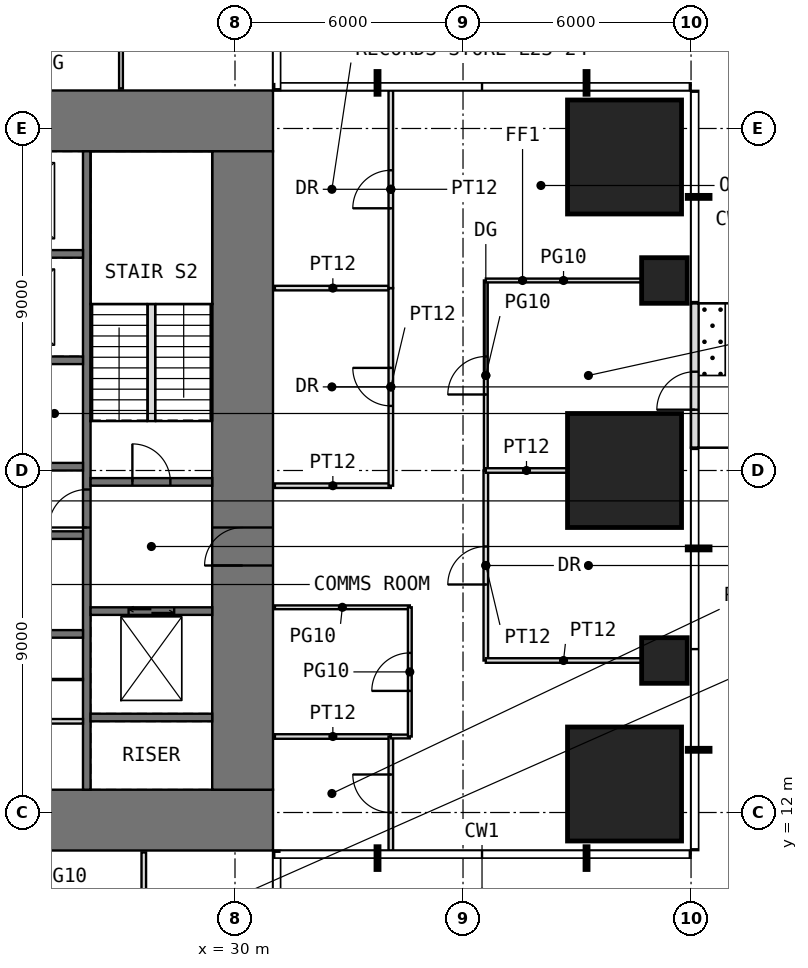
"""IFC4 building model, lengths in metres.
Left out: names, types, materials, properties, quantities, classifications, styles, units other than length and angle.
Written with IfcOpenShell. Run it as: python <this file> out.ifc"""

import sys

from ifc_helpers import new_model, si_unit, direction, frame, frame_2d, origin, origin_2d, place, context, subcontext, project, spatial, rectangle, extrude, element, fill, save


model = new_model("IFC4")
c1 = context("Model", 3, precision=1e-05, world=origin(), true_north=direction((0.0, 1.0)))
c2 = subcontext(c1, "Body", "Model", "MODEL_VIEW")
j1 = project(units=[si_unit("LENGTHUNIT", "METRE"), si_unit("PLANEANGLEUNIT", "RADIAN")], contexts=[c1])
p1 = place(None, origin())
s1 = spatial("IfcSite", under=j1, at=p1, CompositionType="ELEMENT")
p2 = place(p1, origin())
s2 = spatial("IfcBuilding", under=s1, at=p2, CompositionType="ELEMENT")
p3 = place(p2, frame((0.0, 0.0, 100.5)))
s3 = spatial("IfcBuildingStorey", under=s2, at=p3, CompositionType="ELEMENT", Elevation=100.5)
p4 = place(p3, frame((40.25, 12.75, 0.0), z_axis=(0.0, 0.0, 1.0), x_axis=(1.0, 0.0, 0.0)))
e1 = element("IfcColumn", 1, at=p4, inside=s3, PredefinedType="COLUMN", context=c2, shape_type="SweptSolid", body=[
    extrude(rectangle(XDim=3.0, YDim=3.0, at=origin_2d()), origin(), (0.0, 0.0, 1.0), 4.0),
])
p5 = place(p3, frame((41.3, 16.0, 0.0), z_axis=(0.0, 0.0, 1.0), x_axis=(1.0, 0.0, 0.0)))
e2 = element("IfcColumn", 2, at=p5, inside=s3, PredefinedType="COLUMN", context=c2, shape_type="SweptSolid", body=[
    extrude(rectangle(XDim=1.2, YDim=1.2, at=origin_2d()), origin(), (0.0, 0.0, 1.0), 4.0),
])
p6 = place(p3, frame((40.25, 21.0, 0.0), z_axis=(0.0, 0.0, 1.0), x_axis=(1.0, 0.0, 0.0)))
e3 = element("IfcColumn", 3, at=p6, inside=s3, PredefinedType="COLUMN", context=c2, shape_type="SweptSolid", body=[
    extrude(rectangle(XDim=3.0, YDim=3.0, at=origin_2d()), origin(), (0.0, 0.0, 1.0), 4.0),
])
p7 = place(p3, frame((41.3, 26.0, 0.0), z_axis=(0.0, 0.0, 1.0), x_axis=(1.0, 0.0, 0.0)))
e4 = element("IfcColumn", 4, at=p7, inside=s3, PredefinedType="COLUMN", context=c2, shape_type="SweptSolid", body=[
    extrude(rectangle(XDim=1.2, YDim=1.2, at=origin_2d()), origin(), (0.0, 0.0, 1.0), 4.0),
])
p8 = place(p3, frame((40.25, 29.25, 0.0), z_axis=(0.0, 0.0, 1.0), x_axis=(1.0, 0.0, 0.0)))
e5 = element("IfcColumn", 5, at=p8, inside=s3, PredefinedType="COLUMN", context=c2, shape_type="SweptSolid", body=[
    extrude(rectangle(XDim=3.0, YDim=3.0, at=origin_2d()), origin(), (0.0, 0.0, 1.0), 4.0),
])
p9 = place(p3, frame((42.1, 21.6, 0.0), z_axis=(0.0, 0.0, 1.0), x_axis=(0.0, 1.0, 0.0)))
e6 = element("IfcWall", 6, at=p9, inside=s3, PredefinedType="USERDEFINED", context=c2, shape_type="SweptSolid", body=[
    extrude(rectangle(XDim=3.8, YDim=0.2, at=frame_2d((1.9, 0.0))), origin(), (0.0, 0.0, 1.0), 3.75),
])
p10 = place(p9, frame((1.0, 0.0, 0.0)))
e7 = element("IfcOpeningElement", 7, at=p10, cuts=e6, PredefinedType="OPENING", context=c2, shape_type="SweptSolid", body=[
    extrude(rectangle(XDim=1.0, YDim=2.4, at=frame_2d((0.5, 1.2))), frame((0.0, 0.11, 0.0), z_axis=(0.0, -1.0, 0.0), x_axis=(1.0, 0.0, 0.0)), (0.0, 0.0, 1.0), 0.22),
])
p11 = place(p3, frame((11.0, 11.8, -0.05), z_axis=(0.0, 0.0, 1.0), x_axis=(1.0, 0.0, 0.0)))
e8 = element("IfcWall", 8, at=p11, inside=s3, PredefinedType="SHEAR", context=c2, shape_type="SweptSolid", body=[
    extrude(rectangle(XDim=20.0, YDim=1.6, at=frame_2d((10.0, 0.0))), origin(), (0.0, 0.0, 1.0), 4.0),
])
p12 = place(p11, frame((9.0, 0.0, 0.05)))
e9 = element("IfcOpeningElement", 9, at=p12, cuts=e8, PredefinedType="OPENING", context=c2, shape_type="SweptSolid", body=[
    extrude(rectangle(XDim=2.0, YDim=2.2, at=frame_2d((1.0, 1.1))), frame((0.0, 0.81, 0.0), z_axis=(0.0, -1.0, 0.0), x_axis=(1.0, 0.0, 0.0)), (0.0, 0.0, 1.0), 1.62),
])
p13 = place(p3, frame((11.0, 30.2, -0.05), z_axis=(0.0, 0.0, 1.0), x_axis=(1.0, 0.0, 0.0)))
e10 = element("IfcWall", 10, at=p13, inside=s3, PredefinedType="SHEAR", context=c2, shape_type="SweptSolid", body=[
    extrude(rectangle(XDim=20.0, YDim=1.6, at=frame_2d((10.0, 0.0))), origin(), (0.0, 0.0, 1.0), 4.0),
])
p14 = place(p13, frame((9.0, 0.0, 0.05)))
e11 = element("IfcOpeningElement", 11, at=p14, cuts=e10, PredefinedType="OPENING", context=c2, shape_type="SweptSolid", body=[
    extrude(rectangle(XDim=2.0, YDim=2.2, at=frame_2d((1.0, 1.1))), frame((0.0, 0.81, 0.0), z_axis=(0.0, -1.0, 0.0), x_axis=(1.0, 0.0, 0.0)), (0.0, 0.0, 1.0), 1.62),
])
p15 = place(p3, frame((30.2, 12.6, -0.05), z_axis=(0.0, 0.0, 1.0), x_axis=(0.0, 1.0, 0.0)))
e12 = element("IfcWall", 12, at=p15, inside=s3, PredefinedType="SHEAR", context=c2, shape_type="SweptSolid", body=[
    extrude(rectangle(XDim=16.8, YDim=1.6, at=frame_2d((8.4, 0.0))), origin(), (0.0, 0.0, 1.0), 4.0),
])
p16 = place(p15, frame((5.9, 0.0, 0.05)))
e13 = element("IfcOpeningElement", 13, at=p16, cuts=e12, PredefinedType="OPENING", context=c2, shape_type="SweptSolid", body=[
    extrude(rectangle(XDim=1.0, YDim=2.2, at=frame_2d((0.5, 1.1))), frame((0.0, 0.81, 0.0), z_axis=(0.0, -1.0, 0.0), x_axis=(1.0, 0.0, 0.0)), (0.0, 0.0, 1.0), 1.62),
])
p17 = place(p3, frame((26.1, 12.6, -0.05), z_axis=(0.0, 0.0, 1.0), x_axis=(0.0, 1.0, 0.0)))
e14 = element("IfcWall", 14, at=p17, inside=s3, PredefinedType="SHEAR", context=c2, shape_type="SweptSolid", body=[
    extrude(rectangle(XDim=16.8, YDim=0.2, at=frame_2d((8.4, 0.0))), origin(), (0.0, 0.0, 1.0), 4.0),
])
p18 = place(p17, frame((6.9, 0.0, 0.05)))
e15 = element("IfcOpeningElement", 15, at=p18, cuts=e14, PredefinedType="OPENING", context=c2, shape_type="SweptSolid", body=[
    extrude(rectangle(XDim=1.0, YDim=2.2, at=frame_2d((0.5, 1.1))), frame((0.0, 0.11, 0.0), z_axis=(0.0, -1.0, 0.0), x_axis=(1.0, 0.0, 0.0)), (0.0, 0.0, 1.0), 0.22),
])
for number, where, z_axis, x_axis in (
    (16, (22.8, 16.7, -0.05), (0.0, 0.0, 1.0), (1.0, 0.0, 0.0)),
    (17, (22.8, 19.3, -0.05), (0.0, 0.0, 1.0), (1.0, 0.0, 0.0)),
    (18, (22.8, 21.1, -0.05), (0.0, 0.0, 1.0), (1.0, 0.0, 0.0)),
    (19, (22.8, 23.9, -0.05), (0.0, 0.0, 1.0), (1.0, 0.0, 0.0)),
    (20, (22.8, 26.7, -0.05), (0.0, 0.0, 1.0), (1.0, 0.0, 0.0)),
    (21, (26.2, 14.5, -0.05), (0.0, 0.0, 1.0), (1.0, 0.0, 0.0)),
):
    element("IfcWall", number, at=place(p3, frame(where, z_axis=z_axis, x_axis=x_axis)), inside=s3, PredefinedType="SHEAR", context=c2, shape_type="SweptSolid", body=[
        extrude(rectangle(XDim=3.2, YDim=0.2, at=frame_2d((1.6, 0.0))), origin(), (0.0, 0.0, 1.0), 4.0),
    ])
p19 = place(p3, frame((26.2, 17.3, -0.05), z_axis=(0.0, 0.0, 1.0), x_axis=(1.0, 0.0, 0.0)))
e22 = element("IfcWall", 22, at=p19, inside=s3, PredefinedType="SHEAR", context=c2, shape_type="SweptSolid", body=[
    extrude(rectangle(XDim=3.2, YDim=0.2, at=frame_2d((1.6, 0.0))), origin(), (0.0, 0.0, 1.0), 4.0),
])
p20 = place(p19, frame((1.0, 0.0, 0.05)))
e23 = element("IfcOpeningElement", 23, at=p20, cuts=e22, PredefinedType="OPENING", context=c2, shape_type="SweptSolid", body=[
    extrude(rectangle(XDim=1.2, YDim=2.2, at=frame_2d((0.6, 1.1))), frame((0.0, 0.11, 0.0), z_axis=(0.0, -1.0, 0.0), x_axis=(1.0, 0.0, 0.0)), (0.0, 0.0, 1.0), 0.22),
])
p21 = place(p3, frame((26.2, 20.7, -0.05), z_axis=(0.0, 0.0, 1.0), x_axis=(1.0, 0.0, 0.0)))
e24 = element("IfcWall", 24, at=p21, inside=s3, PredefinedType="SHEAR", context=c2, shape_type="SweptSolid", body=[
    extrude(rectangle(XDim=3.2, YDim=0.2, at=frame_2d((1.6, 0.0))), origin(), (0.0, 0.0, 1.0), 4.0),
])
p22 = place(p21, frame((1.1, 0.0, 0.05)))
e25 = element("IfcOpeningElement", 25, at=p22, cuts=e24, PredefinedType="OPENING", context=c2, shape_type="SweptSolid", body=[
    extrude(rectangle(XDim=1.0, YDim=2.2, at=frame_2d((0.5, 1.1))), frame((0.0, 0.11, 0.0), z_axis=(0.0, -1.0, 0.0), x_axis=(1.0, 0.0, 0.0)), (0.0, 0.0, 1.0), 0.22),
])
p23 = place(p3, frame((22.8, 14.4, 0.0), z_axis=(0.0, 0.0, 1.0), x_axis=(1.0, 0.0, 0.0)))
e26 = element("IfcWall", 26, at=p23, inside=s3, PredefinedType="PARTITIONING", context=c2, shape_type="SweptSolid", body=[
    extrude(rectangle(XDim=3.2, YDim=0.12, at=frame_2d((1.6, 0.0))), origin(), (0.0, 0.0, 1.0), 3.75),
])
p24 = place(p3, frame((24.6, 15.5, 0.0), z_axis=(0.0, 0.0, 1.0), x_axis=(1.0, 0.0, 0.0)))
e27 = element("IfcWall", 27, at=p24, inside=s3, PredefinedType="PARTITIONING", context=c2, shape_type="SweptSolid", body=[
    extrude(rectangle(XDim=1.4, YDim=0.03, at=frame_2d((0.7, 0.0))), origin(), (0.0, 0.0, 1.0), 3.75),
])
p25 = place(p3, frame((27.0, 31.05, 0.0), z_axis=(0.0, 0.0, 1.0), x_axis=(0.0, 1.0, 0.0)))
e28 = element("IfcWall", 28, at=p25, inside=s3, PredefinedType="PARTITIONING", context=c2, shape_type="SweptSolid", body=[
    extrude(rectangle(XDim=3.55, YDim=0.1, at=frame_2d((1.775, 0.0))), origin(), (0.0, 0.0, 1.0), 3.75),
])
for number, where, z_axis, x_axis in (
    (29, (27.6, 7.9, 0.0), (0.0, 0.0, 1.0), (0.0, 1.0, 0.0)),
    (30, (31.05, 14.0, 0.0), (0.0, 0.0, 1.0), (1.0, 0.0, 0.0)),
):
    element("IfcWall", number, at=place(p3, frame(where, z_axis=z_axis, x_axis=x_axis)), inside=s3, PredefinedType="PARTITIONING", context=c2, shape_type="SweptSolid", body=[
        extrude(rectangle(XDim=3.05, YDim=0.12, at=frame_2d((1.525, 0.0))), origin(), (0.0, 0.0, 1.0), 3.75),
    ])
p26 = place(p3, frame((31.05, 17.4, 0.0), z_axis=(0.0, 0.0, 1.0), x_axis=(1.0, 0.0, 0.0)))
e31 = element("IfcWall", 31, at=p26, inside=s3, PredefinedType="PARTITIONING", context=c2, shape_type="SweptSolid", body=[
    extrude(rectangle(XDim=3.55, YDim=0.1, at=frame_2d((1.775, 0.0))), origin(), (0.0, 0.0, 1.0), 3.75),
])
for number, where, z_axis, x_axis in (
    (32, (31.05, 20.6, 0.0), (0.0, 0.0, 1.0), (1.0, 0.0, 0.0)),
    (33, (31.05, 25.8, 0.0), (0.0, 0.0, 1.0), (1.0, 0.0, 0.0)),
):
    element("IfcWall", number, at=place(p3, frame(where, z_axis=z_axis, x_axis=x_axis)), inside=s3, PredefinedType="PARTITIONING", context=c2, shape_type="SweptSolid", body=[
        extrude(rectangle(XDim=3.05, YDim=0.12, at=frame_2d((1.525, 0.0))), origin(), (0.0, 0.0, 1.0), 3.75),
    ])
p27 = place(p3, frame((34.1, 11.0, 0.0), z_axis=(0.0, 0.0, 1.0), x_axis=(0.0, 1.0, 0.0)))
e34 = element("IfcWall", 34, at=p27, inside=s3, PredefinedType="PARTITIONING", context=c2, shape_type="SweptSolid", body=[
    extrude(rectangle(XDim=3.0, YDim=0.12, at=frame_2d((1.5, 0.0))), origin(), (0.0, 0.0, 1.0), 3.75),
])
p28 = place(p27, frame((1.0, 0.0, 0.0)))
e35 = element("IfcOpeningElement", 35, at=p28, cuts=e34, PredefinedType="OPENING", context=c2, shape_type="SweptSolid", body=[
    extrude(rectangle(XDim=1.0, YDim=2.2, at=frame_2d((0.5, 1.1))), frame((0.0, 0.07, 0.0), z_axis=(0.0, -1.0, 0.0), x_axis=(1.0, 0.0, 0.0)), (0.0, 0.0, 1.0), 0.14),
])
p29 = place(p3, frame((34.1, 14.0, 0.0), z_axis=(0.0, 0.0, 1.0), x_axis=(1.0, 0.0, 0.0)))
e36 = element("IfcWall", 36, at=p29, inside=s3, PredefinedType="PARTITIONING", context=c2, shape_type="SweptSolid", body=[
    extrude(rectangle(XDim=0.5, YDim=0.1, at=frame_2d((0.25, 0.0))), origin(), (0.0, 0.0, 1.0), 3.75),
])
p30 = place(p3, frame((34.1, 20.6, 0.0), z_axis=(0.0, 0.0, 1.0), x_axis=(0.0, 1.0, 0.0)))
e37 = element("IfcWall", 37, at=p30, inside=s3, PredefinedType="PARTITIONING", context=c2, shape_type="SweptSolid", body=[
    extrude(rectangle(XDim=5.2, YDim=0.12, at=frame_2d((2.6, 0.0))), origin(), (0.0, 0.0, 1.0), 3.75),
])
p31 = place(p30, frame((2.1, 0.0, 0.0)))
e38 = element("IfcOpeningElement", 38, at=p31, cuts=e37, PredefinedType="OPENING", context=c2, shape_type="SweptSolid", body=[
    extrude(rectangle(XDim=1.0, YDim=2.2, at=frame_2d((0.5, 1.1))), frame((0.0, 0.07, 0.0), z_axis=(0.0, -1.0, 0.0), x_axis=(1.0, 0.0, 0.0)), (0.0, 0.0, 1.0), 0.14),
])
p32 = place(p3, frame((34.1, 25.8, 0.0), z_axis=(0.0, 0.0, 1.0), x_axis=(0.0, 1.0, 0.0)))
e39 = element("IfcWall", 39, at=p32, inside=s3, PredefinedType="PARTITIONING", context=c2, shape_type="SweptSolid", body=[
    extrude(rectangle(XDim=5.2, YDim=0.12, at=frame_2d((2.6, 0.0))), origin(), (0.0, 0.0, 1.0), 3.75),
])
p33 = place(p32, frame((2.1, 0.0, 0.0)))
e40 = element("IfcOpeningElement", 40, at=p33, cuts=e39, PredefinedType="OPENING", context=c2, shape_type="SweptSolid", body=[
    extrude(rectangle(XDim=1.0, YDim=2.2, at=frame_2d((0.5, 1.1))), frame((0.0, 0.07, 0.0), z_axis=(0.0, -1.0, 0.0), x_axis=(1.0, 0.0, 0.0)), (0.0, 0.0, 1.0), 0.14),
])
p34 = place(p3, frame((34.6, 14.0, 0.0), z_axis=(0.0, 0.0, 1.0), x_axis=(0.0, 1.0, 0.0)))
e41 = element("IfcWall", 41, at=p34, inside=s3, PredefinedType="PARTITIONING", context=c2, shape_type="SweptSolid", body=[
    extrude(rectangle(XDim=3.4, YDim=0.1, at=frame_2d((1.7, 0.0))), origin(), (0.0, 0.0, 1.0), 3.75),
])
p35 = place(p34, frame((1.2, 0.0, 0.0)))
e42 = element("IfcOpeningElement", 42, at=p35, cuts=e41, PredefinedType="OPENING", context=c2, shape_type="SweptSolid", body=[
    extrude(rectangle(XDim=1.0, YDim=2.4, at=frame_2d((0.5, 1.2))), frame((0.0, 0.06, 0.0), z_axis=(0.0, -1.0, 0.0), x_axis=(1.0, 0.0, 0.0)), (0.0, 0.0, 1.0), 0.12),
])
p36 = place(p3, frame((36.6, 16.0, 0.0), z_axis=(0.0, 0.0, 1.0), x_axis=(0.0, 1.0, 0.0)))
e43 = element("IfcWall", 43, at=p36, inside=s3, PredefinedType="PARTITIONING", context=c2, shape_type="SweptSolid", body=[
    extrude(rectangle(XDim=5.0, YDim=0.12, at=frame_2d((2.5, 0.0))), origin(), (0.0, 0.0, 1.0), 3.75),
])
p37 = place(p36, frame((2.0, 0.0, 0.0)))
e44 = element("IfcOpeningElement", 44, at=p37, cuts=e43, PredefinedType="OPENING", context=c2, shape_type="SweptSolid", body=[
    extrude(rectangle(XDim=1.0, YDim=2.2, at=frame_2d((0.5, 1.1))), frame((0.0, 0.07, 0.0), z_axis=(0.0, -1.0, 0.0), x_axis=(1.0, 0.0, 0.0)), (0.0, 0.0, 1.0), 0.14),
])
p38 = place(p3, frame((36.6, 16.0, 0.0), z_axis=(0.0, 0.0, 1.0), x_axis=(1.0, 0.0, 0.0)))
e45 = element("IfcWall", 45, at=p38, inside=s3, PredefinedType="PARTITIONING", context=c2, shape_type="SweptSolid", body=[
    extrude(rectangle(XDim=4.09, YDim=0.12, at=frame_2d((2.045, 0.0))), origin(), (0.0, 0.0, 1.0), 3.75),
])
p39 = place(p3, frame((36.6, 21.0, 0.0), z_axis=(0.0, 0.0, 1.0), x_axis=(0.0, 1.0, 0.0)))
e46 = element("IfcWall", 46, at=p39, inside=s3, PredefinedType="PARTITIONING", context=c2, shape_type="SweptSolid", body=[
    extrude(rectangle(XDim=5.0, YDim=0.1, at=frame_2d((2.5, 0.0))), origin(), (0.0, 0.0, 1.0), 3.75),
])
p40 = place(p39, frame((2.0, 0.0, 0.0)))
e47 = element("IfcOpeningElement", 47, at=p40, cuts=e46, PredefinedType="OPENING", context=c2, shape_type="SweptSolid", body=[
    extrude(rectangle(XDim=1.0, YDim=2.4, at=frame_2d((0.5, 1.2))), frame((0.0, 0.06, 0.0), z_axis=(0.0, -1.0, 0.0), x_axis=(1.0, 0.0, 0.0)), (0.0, 0.0, 1.0), 0.12),
])
p41 = place(p3, frame((36.6, 21.0, 0.0), z_axis=(0.0, 0.0, 1.0), x_axis=(1.0, 0.0, 0.0)))
e48 = element("IfcWall", 48, at=p41, inside=s3, PredefinedType="PARTITIONING", context=c2, shape_type="SweptSolid", body=[
    extrude(rectangle(XDim=2.14, YDim=0.12, at=frame_2d((1.07, 0.0))), origin(), (0.0, 0.0, 1.0), 3.75),
])
p42 = place(p3, frame((36.6, 26.0, 0.0), z_axis=(0.0, 0.0, 1.0), x_axis=(1.0, 0.0, 0.0)))
e49 = element("IfcWall", 49, at=p42, inside=s3, PredefinedType="PARTITIONING", context=c2, shape_type="SweptSolid", body=[
    extrude(rectangle(XDim=4.09, YDim=0.1, at=frame_2d((2.045, 0.0))), origin(), (0.0, 0.0, 1.0), 3.75),
])
p43 = place(p3, frame((27.8, 22.3, 0.0), z_axis=(0.0, 0.0, 1.0), x_axis=(0.0, 1.0, 0.0)))
e50 = element("IfcWall", 50, at=p43, inside=s3, PredefinedType="PARTITIONING", context=c2, shape_type="SweptSolid", body=[
    extrude(rectangle(XDim=3.08, YDim=0.2, at=frame_2d((1.54, 0.0))), origin(), (0.0, 0.0, 1.0), 4.0),
])
p44 = place(p10, origin())
e51 = element("IfcDoor", 51, at=p44, inside=s3, OperationType="SINGLE_SWING_LEFT", PredefinedType="DOOR", context=c2, shape_type="SweptSolid", body=[
    extrude(rectangle(XDim=1.0, YDim=2.4, at=frame_2d((0.5, 1.2))), frame((0.0, 0.025, 0.0), z_axis=(0.0, -1.0, 0.0), x_axis=(1.0, 0.0, 0.0)), (0.0, 0.0, 1.0), 0.05),
])
fill(e7, e51)
p45 = place(p16, origin())
e52 = element("IfcDoor", 52, at=p45, inside=s3, OperationType="SINGLE_SWING_LEFT", PredefinedType="DOOR", context=c2, shape_type="SweptSolid", body=[
    extrude(rectangle(XDim=1.0, YDim=2.2, at=frame_2d((0.5, 1.1))), frame((0.0, 0.025, 0.0), z_axis=(0.0, -1.0, 0.0), x_axis=(1.0, 0.0, 0.0)), (0.0, 0.0, 1.0), 0.05),
])
fill(e13, e52)
p46 = place(p22, origin())
e53 = element("IfcDoor", 53, at=p46, inside=s3, OperationType="SINGLE_SWING_LEFT", PredefinedType="DOOR", context=c2, shape_type="SweptSolid", body=[
    extrude(rectangle(XDim=1.0, YDim=2.2, at=frame_2d((0.5, 1.1))), frame((0.0, 0.025, 0.0), z_axis=(0.0, -1.0, 0.0), x_axis=(1.0, 0.0, 0.0)), (0.0, 0.0, 1.0), 0.05),
])
fill(e25, e53)
p47 = place(p18, origin())
e54 = element("IfcDoor", 54, at=p47, inside=s3, OperationType="SINGLE_SWING_LEFT", PredefinedType="DOOR", context=c2, shape_type="SweptSolid", body=[
    extrude(rectangle(XDim=1.0, YDim=2.2, at=frame_2d((0.5, 1.1))), frame((0.0, 0.025, 0.0), z_axis=(0.0, -1.0, 0.0), x_axis=(1.0, 0.0, 0.0)), (0.0, 0.0, 1.0), 0.05),
])
fill(e15, e54)
p48 = place(p28, origin())
e55 = element("IfcDoor", 55, at=p48, inside=s3, OperationType="SINGLE_SWING_RIGHT", PredefinedType="DOOR", context=c2, shape_type="SweptSolid", body=[
    extrude(rectangle(XDim=1.0, YDim=2.2, at=frame_2d((0.5, 1.1))), frame((0.0, 0.025, 0.0), z_axis=(0.0, -1.0, 0.0), x_axis=(1.0, 0.0, 0.0)), (0.0, 0.0, 1.0), 0.05),
])
fill(e35, e55)
p49 = place(p35, origin())
e56 = element("IfcDoor", 56, at=p49, inside=s3, OperationType="SINGLE_SWING_LEFT", PredefinedType="DOOR", context=c2, shape_type="SweptSolid", body=[
    extrude(rectangle(XDim=1.0, YDim=2.4, at=frame_2d((0.5, 1.2))), frame((0.0, 0.025, 0.0), z_axis=(0.0, -1.0, 0.0), x_axis=(1.0, 0.0, 0.0)), (0.0, 0.0, 1.0), 0.05),
])
fill(e42, e56)
p50 = place(p31, origin())
e57 = element("IfcDoor", 57, at=p50, inside=s3, OperationType="SINGLE_SWING_RIGHT", PredefinedType="DOOR", context=c2, shape_type="SweptSolid", body=[
    extrude(rectangle(XDim=1.0, YDim=2.2, at=frame_2d((0.5, 1.1))), frame((0.0, 0.025, 0.0), z_axis=(0.0, -1.0, 0.0), x_axis=(1.0, 0.0, 0.0)), (0.0, 0.0, 1.0), 0.05),
])
fill(e38, e57)
p51 = place(p33, origin())
e58 = element("IfcDoor", 58, at=p51, inside=s3, OperationType="SINGLE_SWING_LEFT", PredefinedType="DOOR", context=c2, shape_type="SweptSolid", body=[
    extrude(rectangle(XDim=1.0, YDim=2.2, at=frame_2d((0.5, 1.1))), frame((0.0, 0.025, 0.0), z_axis=(0.0, -1.0, 0.0), x_axis=(1.0, 0.0, 0.0)), (0.0, 0.0, 1.0), 0.05),
])
fill(e40, e58)
p52 = place(p37, origin())
e59 = element("IfcDoor", 59, at=p52, inside=s3, OperationType="SINGLE_SWING_LEFT", PredefinedType="DOOR", context=c2, shape_type="SweptSolid", body=[
    extrude(rectangle(XDim=1.0, YDim=2.2, at=frame_2d((0.5, 1.1))), frame((0.0, 0.025, 0.0), z_axis=(0.0, -1.0, 0.0), x_axis=(1.0, 0.0, 0.0)), (0.0, 0.0, 1.0), 0.05),
])
fill(e44, e59)
p53 = place(p40, origin())
e60 = element("IfcDoor", 60, at=p53, inside=s3, OperationType="SINGLE_SWING_LEFT", PredefinedType="DOOR", context=c2, shape_type="SweptSolid", body=[
    extrude(rectangle(XDim=1.0, YDim=2.4, at=frame_2d((0.5, 1.2))), frame((0.0, 0.025, 0.0), z_axis=(0.0, -1.0, 0.0), x_axis=(1.0, 0.0, 0.0)), (0.0, 0.0, 1.0), 0.05),
])
fill(e47, e60)
p54 = place(p20, origin())
e61 = element("IfcDoor", 61, at=p54, inside=s3, OperationType="DOUBLE_DOOR_SLIDING", PredefinedType="DOOR", context=c2, shape_type="SweptSolid", body=[
    extrude(rectangle(XDim=1.2, YDim=2.2, at=frame_2d((0.6, 1.1))), frame((0.0, 0.025, 0.0), z_axis=(0.0, -1.0, 0.0), x_axis=(1.0, 0.0, 0.0)), (0.0, 0.0, 1.0), 0.05),
])
fill(e23, e61)
save(model, sys.argv[1])
